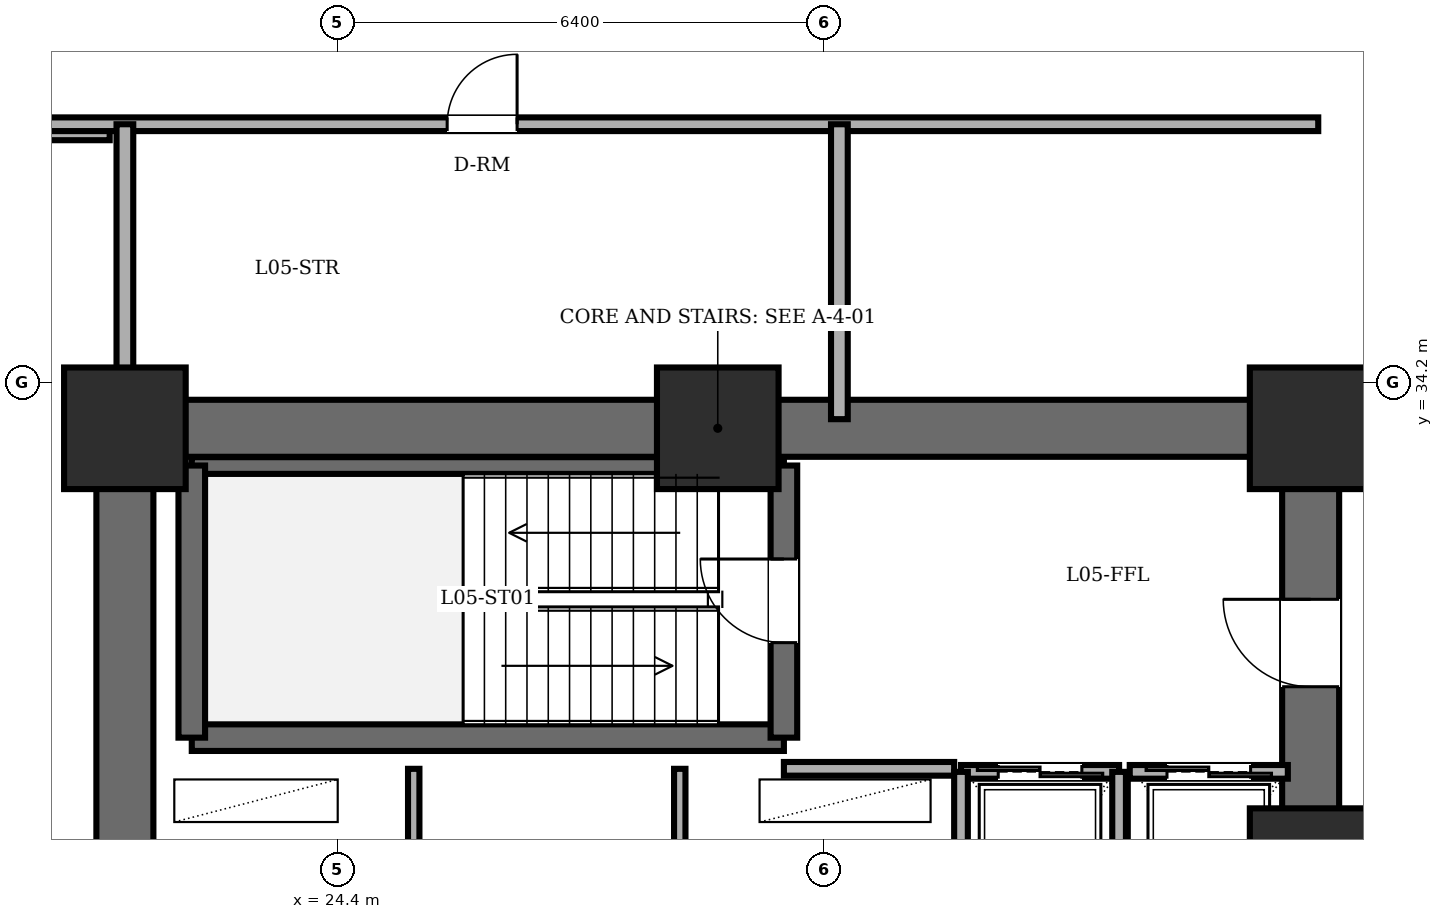
"""IFC4 building model, lengths in metres.
Left out: names, types, materials, properties, quantities, classifications, styles, units other than length and angle.
Written with IfcOpenShell. Run it as: python <this file> out.ifc"""

import sys

from ifc_helpers import new_model, si_unit, direction, frame, frame_2d, origin, origin_2d, place, context, subcontext, project, spatial, rectangle, extrude, element, fill, save


model = new_model("IFC4")
c1 = context("Model", 3, precision=1e-05, world=origin(), true_north=direction((0.0, 1.0)))
c2 = subcontext(c1, "Body", "Model", "MODEL_VIEW")
j1 = project(units=[si_unit("LENGTHUNIT", "METRE"), si_unit("PLANEANGLEUNIT", "RADIAN")], contexts=[c1])
p1 = place(None, origin())
s1 = spatial("IfcSite", under=j1, at=p1, CompositionType="ELEMENT")
p2 = place(p1, origin())
s2 = spatial("IfcBuilding", under=s1, at=p2, CompositionType="ELEMENT")
p3 = place(p2, frame((0.0, 0.0, 19.35)))
s3 = spatial("IfcBuildingStorey", under=s2, at=p3, CompositionType="ELEMENT", Elevation=19.35)
for number, where, z_axis, x_axis in (
    (1, (37.2, 27.8, 0.0), (0.0, 0.0, 1.0), (1.0, 0.0, 0.0)),
    (2, (37.2, 33.6, 0.0), (0.0, 0.0, 1.0), (1.0, 0.0, 0.0)),
    (3, (29.4, 33.6, 0.0), (0.0, 0.0, 1.0), (1.0, 0.0, 0.0)),
    (4, (21.6, 33.6, 0.0), (0.0, 0.0, 1.0), (1.0, 0.0, 0.0)),
):
    element("IfcColumn", number, at=place(p3, frame(where, z_axis=z_axis, x_axis=x_axis)), inside=s3, PredefinedType="COLUMN", context=c2, shape_type="SweptSolid", body=[
        extrude(rectangle(XDim=1.6, YDim=1.6, at=origin_2d()), origin(), (0.0, 0.0, 1.0), 4.65),
    ])
p4 = place(p3, frame((21.6, 14.4, 0.0), z_axis=(0.0, 0.0, 1.0), x_axis=(0.0, 1.0, 0.0)))
e5 = element("IfcWall", 5, at=p4, inside=s3, PredefinedType="SHEAR", context=c2, shape_type="SweptSolid", body=[
    extrude(rectangle(XDim=19.2, YDim=0.75, at=frame_2d((9.6, 0.0))), origin(), (0.0, 0.0, 1.0), 4.41),
])
p5 = place(p3, frame((21.6, 33.6, 0.0), z_axis=(0.0, 0.0, 1.0), x_axis=(1.0, 0.0, 0.0)))
e6 = element("IfcWall", 6, at=p5, inside=s3, PredefinedType="SHEAR", context=c2, shape_type="SweptSolid", body=[
    extrude(rectangle(XDim=15.6, YDim=0.75, at=frame_2d((7.8, 0.0))), origin(), (0.0, 0.0, 1.0), 4.41),
])
p6 = place(p3, frame((37.2, 14.4, 0.0), z_axis=(0.0, 0.0, 1.0), x_axis=(0.0, 1.0, 0.0)))
e7 = element("IfcWall", 7, at=p6, inside=s3, PredefinedType="SHEAR", context=c2, shape_type="SweptSolid", body=[
    extrude(rectangle(XDim=19.2, YDim=0.75, at=frame_2d((9.6, 0.0))), origin(), (0.0, 0.0, 1.0), 4.41),
])
p7 = place(p6, frame((15.8, 0.0, 0.0)))
e8 = element("IfcOpeningElement", 8, at=p7, cuts=e7, PredefinedType="OPENING", context=c2, shape_type="SweptSolid", body=[
    extrude(rectangle(XDim=1.15, YDim=2.15, at=frame_2d((0.575, 1.075))), frame((0.0, 0.385, 0.0), z_axis=(0.0, -1.0, 0.0), x_axis=(1.0, 0.0, 0.0)), (0.0, 0.0, 1.0), 0.77),
])
p8 = place(p6, frame((3.6, 0.0, 0.0)))
e9 = element("IfcOpeningElement", 9, at=p8, cuts=e7, PredefinedType="OPENING", context=c2, shape_type="SweptSolid", body=[
    extrude(rectangle(XDim=1.1, YDim=2.15, at=frame_2d((0.55, 1.075))), frame((0.0, 0.385, 0.0), z_axis=(0.0, -1.0, 0.0), x_axis=(1.0, 0.0, 0.0)), (0.0, 0.0, 1.0), 0.77),
])
p9 = place(p6, frame((8.6, 0.0, 0.0)))
e10 = element("IfcOpeningElement", 10, at=p9, cuts=e7, PredefinedType="OPENING", context=c2, shape_type="SweptSolid", body=[
    extrude(rectangle(XDim=1.3, YDim=2.2, at=frame_2d((0.65, 1.1))), frame((0.0, 0.385, 0.0), z_axis=(0.0, -1.0, 0.0), x_axis=(1.0, 0.0, 0.0)), (0.0, 0.0, 1.0), 0.77),
])
p10 = place(p3, frame((22.48, 29.53, 0.0), z_axis=(0.0, 0.0, 1.0), x_axis=(1.0, 0.0, 0.0)))
e11 = element("IfcWall", 11, at=p10, inside=s3, PredefinedType="SOLIDWALL", context=c2, shape_type="SweptSolid", body=[
    extrude(rectangle(XDim=7.79, YDim=0.35, at=frame_2d((3.895, 0.0))), origin(), (0.0, 0.0, 1.0), 4.41),
])
p11 = place(p3, frame((22.48, 33.11, 0.0), z_axis=(0.0, 0.0, 1.0), x_axis=(1.0, 0.0, 0.0)))
e12 = element("IfcWall", 12, at=p11, inside=s3, PredefinedType="PARTITIONING", context=c2, shape_type="SweptSolid", body=[
    extrude(rectangle(XDim=7.79, YDim=0.22, at=frame_2d((3.895, 0.0))), origin(), (0.0, 0.0, 1.0), 4.41),
])
p12 = place(p3, frame((22.48, 29.53, 0.0), z_axis=(0.0, 0.0, 1.0), x_axis=(0.0, 1.0, 0.0)))
e13 = element("IfcWall", 13, at=p12, inside=s3, PredefinedType="SOLIDWALL", context=c2, shape_type="SweptSolid", body=[
    extrude(rectangle(XDim=3.58, YDim=0.35, at=frame_2d((1.79, 0.0))), origin(), (0.0, 0.0, 1.0), 4.41),
])
p13 = place(p3, frame((30.27, 29.53, 0.0), z_axis=(0.0, 0.0, 1.0), x_axis=(0.0, 1.0, 0.0)))
e14 = element("IfcWall", 14, at=p13, inside=s3, PredefinedType="SOLIDWALL", context=c2, shape_type="SweptSolid", body=[
    extrude(rectangle(XDim=3.58, YDim=0.35, at=frame_2d((1.79, 0.0))), origin(), (0.0, 0.0, 1.0), 4.41),
])
p14 = place(p13, frame((1.25, 0.0, 0.0)))
e15 = element("IfcOpeningElement", 15, at=p14, cuts=e14, PredefinedType="OPENING", context=c2, shape_type="SweptSolid", body=[
    extrude(rectangle(XDim=1.1, YDim=2.15, at=frame_2d((0.55, 1.075))), frame((0.0, 0.185, 0.0), z_axis=(0.0, -1.0, 0.0), x_axis=(1.0, 0.0, 0.0)), (0.0, 0.0, 1.0), 0.37),
])
p15 = place(p3, frame((30.27, 29.12, 0.0), z_axis=(0.0, 0.0, 1.0), x_axis=(1.0, 0.0, 0.0)))
e16 = element("IfcWall", 16, at=p15, inside=s3, PredefinedType="PARTITIONING", context=c2, shape_type="SweptSolid", body=[
    extrude(rectangle(XDim=2.24, YDim=0.18, at=frame_2d((1.12, 0.0))), origin(), (0.0, 0.0, 1.0), 4.41),
])
for number, where, z_axis, x_axis in (
    (17, (25.4, 27.6, 0.0), (0.0, 0.0, 1.0), (0.0, 1.0, 0.0)),
    (18, (28.9, 27.6, 0.0), (0.0, 0.0, 1.0), (0.0, 1.0, 0.0)),
):
    element("IfcWall", number, at=place(p3, frame(where, z_axis=z_axis, x_axis=x_axis)), inside=s3, PredefinedType="PARTITIONING", context=c2, shape_type="SweptSolid", body=[
        extrude(rectangle(XDim=1.52, YDim=0.15, at=frame_2d((0.76, 0.0))), origin(), (0.0, 0.0, 1.0), 4.41),
    ])
p16 = place(p3, frame((32.6, 29.08, 0.0), z_axis=(0.0, 0.0, 1.0), x_axis=(1.0, 0.0, 0.0)))
e19 = element("IfcWall", 19, at=p16, inside=s3, PredefinedType="PARTITIONING", context=c2, shape_type="SweptSolid", body=[
    extrude(rectangle(XDim=2.08, YDim=0.18, at=frame_2d((1.04, 0.0))), origin(), (0.0, 0.0, 1.0), 4.41),
])
p17 = place(p16, frame((0.49, 0.0, 0.0)))
e20 = element("IfcOpeningElement", 20, at=p17, cuts=e19, PredefinedType="OPENING", context=c2, shape_type="SweptSolid", body=[
    extrude(rectangle(XDim=1.1, YDim=2.2, at=frame_2d((0.55, 1.1))), frame((0.0, 0.1, 0.0), z_axis=(0.0, -1.0, 0.0), x_axis=(1.0, 0.0, 0.0)), (0.0, 0.0, 1.0), 0.2),
])
for number, where, z_axis, x_axis in (
    (21, (34.68, 26.35, 0.0), (0.0, 0.0, 1.0), (0.0, 1.0, 0.0)),
    (22, (32.6, 29.08, 0.0), (0.0, 0.0, 1.0), (0.0, -1.0, 0.0)),
):
    element("IfcWall", number, at=place(p3, frame(where, z_axis=z_axis, x_axis=x_axis)), inside=s3, PredefinedType="PARTITIONING", context=c2, shape_type="SweptSolid", body=[
        extrude(rectangle(XDim=2.73, YDim=0.18, at=frame_2d((1.365, 0.0))), origin(), (0.0, 0.0, 1.0), 4.41),
    ])
p18 = place(p3, frame((34.82, 29.08, 0.0), z_axis=(0.0, 0.0, 1.0), x_axis=(1.0, 0.0, 0.0)))
e23 = element("IfcWall", 23, at=p18, inside=s3, PredefinedType="PARTITIONING", context=c2, shape_type="SweptSolid", body=[
    extrude(rectangle(XDim=2.08, YDim=0.18, at=frame_2d((1.04, 0.0))), origin(), (0.0, 0.0, 1.0), 4.41),
])
p19 = place(p18, frame((0.49, 0.0, 0.0)))
e24 = element("IfcOpeningElement", 24, at=p19, cuts=e23, PredefinedType="OPENING", context=c2, shape_type="SweptSolid", body=[
    extrude(rectangle(XDim=1.1, YDim=2.2, at=frame_2d((0.55, 1.1))), frame((0.0, 0.1, 0.0), z_axis=(0.0, -1.0, 0.0), x_axis=(1.0, 0.0, 0.0)), (0.0, 0.0, 1.0), 0.2),
])
p20 = place(p3, frame((1.6, 37.5, 0.0), z_axis=(0.0, 0.0, 1.0), x_axis=(1.0, 0.0, 0.0)))
e25 = element("IfcWall", 25, at=p20, inside=s3, PredefinedType="PARTITIONING", context=c2, shape_type="SweptSolid", body=[
    extrude(rectangle(XDim=19.8, YDim=0.22, at=frame_2d((9.9, 0.0))), origin(), (0.0, 0.0, 1.0), 4.41),
])
p21 = place(p3, frame((17.85, 37.6, 0.0), z_axis=(0.0, 0.0, 1.0), x_axis=(1.0, 0.0, 0.0)))
e26 = element("IfcWall", 26, at=p21, inside=s3, PredefinedType="PARTITIONING", context=c2, shape_type="SweptSolid", body=[
    extrude(rectangle(XDim=19.45, YDim=0.18, at=frame_2d((9.725, 0.0))), origin(), (0.0, 0.0, 1.0), 4.41),
])
p22 = place(p21, frame((7.99, 0.0, 0.0)))
e27 = element("IfcOpeningElement", 27, at=p22, cuts=e26, PredefinedType="OPENING", context=c2, shape_type="SweptSolid", body=[
    extrude(rectangle(XDim=0.92, YDim=2.1, at=frame_2d((0.46, 1.05))), frame((0.0, 0.1, 0.0), z_axis=(0.0, -1.0, 0.0), x_axis=(1.0, 0.0, 0.0)), (0.0, 0.0, 1.0), 0.2),
])
p23 = place(p3, frame((21.6, 33.72, 0.0), z_axis=(0.0, 0.0, 1.0), x_axis=(0.0, 1.0, 0.0)))
e28 = element("IfcWall", 28, at=p23, inside=s3, PredefinedType="PARTITIONING", context=c2, shape_type="SweptSolid", body=[
    extrude(rectangle(XDim=3.88, YDim=0.22, at=frame_2d((1.94, 0.0))), origin(), (0.0, 0.0, 1.0), 3.592),
])
p24 = place(p3, frame((31.0, 33.72, 0.0), z_axis=(0.0, 0.0, 1.0), x_axis=(0.0, 1.0, 0.0)))
e29 = element("IfcWall", 29, at=p24, inside=s3, PredefinedType="PARTITIONING", context=c2, shape_type="SweptSolid", body=[
    extrude(rectangle(XDim=3.88, YDim=0.22, at=frame_2d((1.94, 0.0))), origin(), (0.0, 0.0, 1.0), 4.41),
])
p25 = place(p14, origin())
e30 = element("IfcDoor", 30, at=p25, inside=s3, OperationType="SINGLE_SWING_RIGHT", PredefinedType="DOOR", context=c2, shape_type="SweptSolid", body=[
    extrude(rectangle(XDim=1.1, YDim=2.15, at=frame_2d((0.55, 1.075))), frame((0.0, 0.025, 0.0), z_axis=(0.0, -1.0, 0.0), x_axis=(1.0, 0.0, 0.0)), (0.0, 0.0, 1.0), 0.05),
])
fill(e15, e30)
p26 = place(p7, origin())
e31 = element("IfcDoor", 31, at=p26, inside=s3, OperationType="SINGLE_SWING_RIGHT", PredefinedType="DOOR", context=c2, shape_type="SweptSolid", body=[
    extrude(rectangle(XDim=1.15, YDim=2.15, at=frame_2d((0.575, 1.075))), frame((0.0, 0.025, 0.0), z_axis=(0.0, -1.0, 0.0), x_axis=(1.0, 0.0, 0.0)), (0.0, 0.0, 1.0), 0.05),
])
fill(e8, e31)
p27 = place(p17, origin())
e32 = element("IfcDoor", 32, at=p27, inside=s3, OperationType="DOUBLE_DOOR_SLIDING", PredefinedType="DOOR", context=c2, shape_type="SweptSolid", body=[
    extrude(rectangle(XDim=1.1, YDim=2.2, at=frame_2d((0.55, 1.1))), frame((0.0, 0.025, 0.0), z_axis=(0.0, -1.0, 0.0), x_axis=(1.0, 0.0, 0.0)), (0.0, 0.0, 1.0), 0.05),
])
fill(e20, e32)
p28 = place(p19, origin())
e33 = element("IfcDoor", 33, at=p28, inside=s3, OperationType="DOUBLE_DOOR_SLIDING", PredefinedType="DOOR", context=c2, shape_type="SweptSolid", body=[
    extrude(rectangle(XDim=1.1, YDim=2.2, at=frame_2d((0.55, 1.1))), frame((0.0, 0.025, 0.0), z_axis=(0.0, -1.0, 0.0), x_axis=(1.0, 0.0, 0.0)), (0.0, 0.0, 1.0), 0.05),
])
fill(e24, e33)
p29 = place(p22, origin())
e34 = element("IfcDoor", 34, at=p29, inside=s3, OperationType="SINGLE_SWING_RIGHT", PredefinedType="DOOR", context=c2, shape_type="SweptSolid", body=[
    extrude(rectangle(XDim=0.92, YDim=2.1, at=frame_2d((0.46, 1.05))), frame((0.0, 0.025, 0.0), z_axis=(0.0, -1.0, 0.0), x_axis=(1.0, 0.0, 0.0)), (0.0, 0.0, 1.0), 0.05),
])
fill(e27, e34)
save(model, sys.argv[1])
